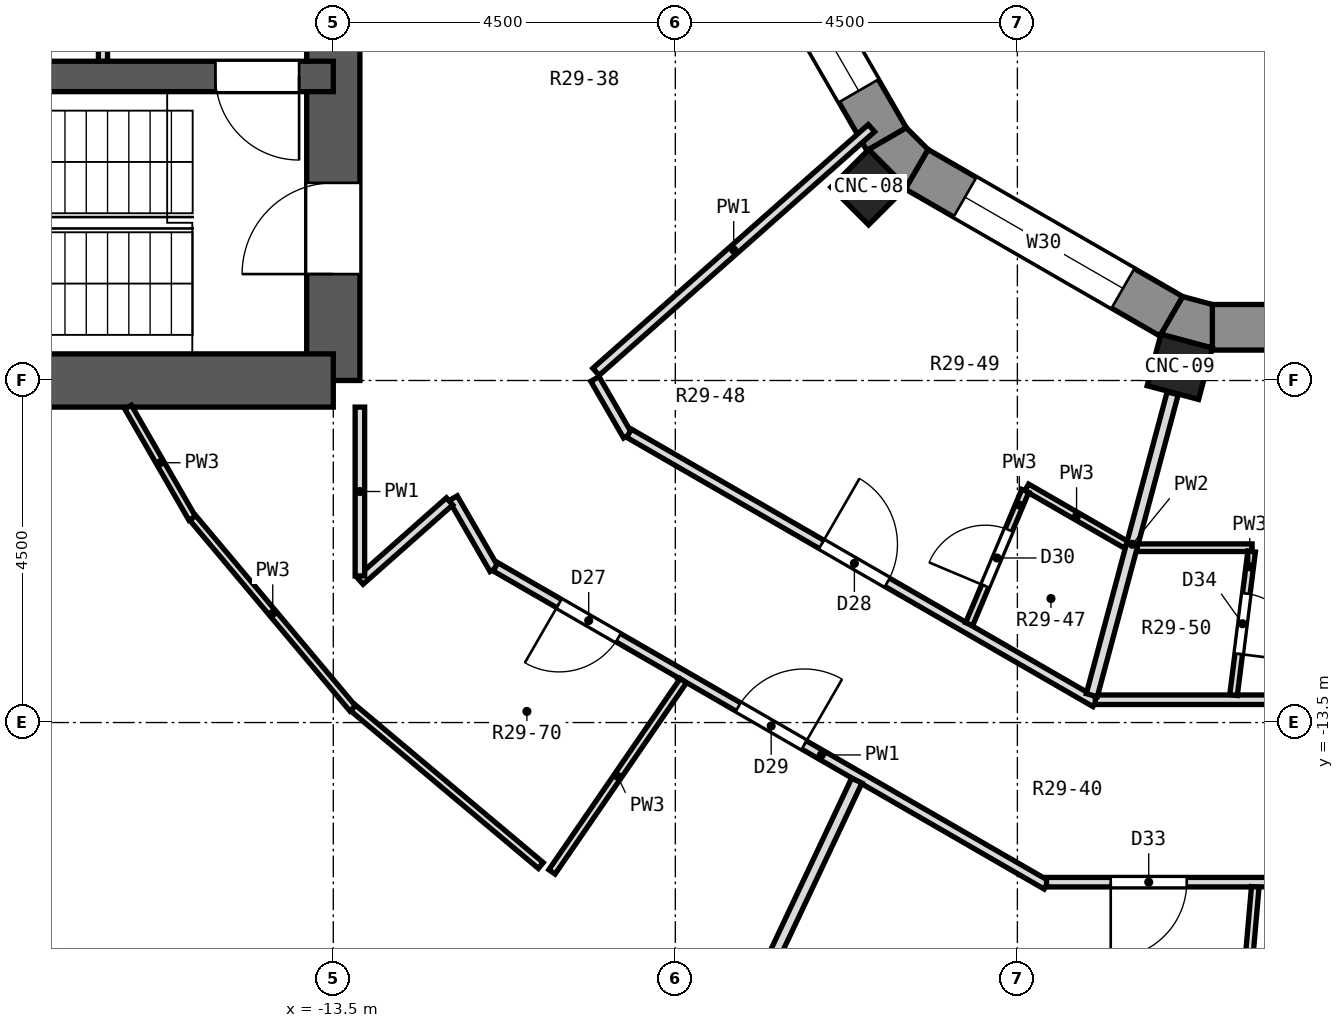
"""IFC4 building model, lengths in metres.
Left out: names, types, materials, properties, quantities, classifications, styles, units other than length and angle.
Written with IfcOpenShell. Run it as: python <this file> out.ifc"""

import sys

from ifc_helpers import new_model, si_unit, direction, frame, frame_2d, origin, origin_2d, place, context, subcontext, project, spatial, polyline, rectangle, outline, extrude, element, fill, save


model = new_model("IFC4")
c1 = context("Model", 3, precision=1e-05, world=origin(), true_north=direction((0.0, 1.0)))
c2 = subcontext(c1, "Body", "Model", "MODEL_VIEW")
j1 = project(units=[si_unit("LENGTHUNIT", "METRE"), si_unit("PLANEANGLEUNIT", "RADIAN")], contexts=[c1])
p1 = place(None, origin())
s1 = spatial("IfcSite", under=j1, at=p1, CompositionType="ELEMENT")
p2 = place(p1, origin())
s2 = spatial("IfcBuilding", under=s1, at=p2, CompositionType="ELEMENT")
p3 = place(p2, frame((0.0, 0.0, 200.4)))
s3 = spatial("IfcBuildingStorey", under=s2, at=p3, CompositionType="ELEMENT", Elevation=200.4)
for number, where, z_axis, x_axis in (
    (1, (-6.458, -6.458, 0.0), (0.0, 0.0, 1.0), (-0.707, -0.707, 0.0)),
    (2, (-2.364, -8.821, 0.0), (0.0, 0.0, 1.0), (-0.259, -0.966, 0.0)),
):
    element("IfcColumn", number, at=place(p3, frame(where, z_axis=z_axis, x_axis=x_axis)), inside=s3, PredefinedType="COLUMN", context=c2, shape_type="SweptSolid", body=[
        extrude(rectangle(XDim=0.7, YDim=0.7, at=origin_2d()), origin(), (0.0, 0.0, 1.0), 3.3),
    ])
p4 = place(p3, frame((-13.5, -9.0, 0.0), z_axis=(0.0, 0.0, 1.0), x_axis=(0.0, 1.0, 0.0)))
e3 = element("IfcWall", 3, at=p4, inside=s3, PredefinedType="SHEAR", context=c2, shape_type="SweptSolid", body=[
    extrude(rectangle(XDim=18.0, YDim=0.7, at=frame_2d((9.0, 0.0))), origin(), (0.0, 0.0, 1.0), 3.3),
])
p5 = place(p4, frame((15.4, 0.0, 0.0)))
e4 = element("IfcOpeningElement", 4, at=p5, cuts=e3, PredefinedType="OPENING", context=c2, shape_type="SweptSolid", body=[
    extrude(rectangle(XDim=1.2, YDim=2.1, at=frame_2d((0.6, 1.05))), frame((0.0, 0.362, 0.0), z_axis=(0.0, -1.0, 0.0), x_axis=(1.0, 0.0, 0.0)), (0.0, 0.0, 1.0), 0.724),
])
p6 = place(p4, frame((1.4, 0.0, 0.0)))
e5 = element("IfcOpeningElement", 5, at=p6, cuts=e3, PredefinedType="OPENING", context=c2, shape_type="SweptSolid", body=[
    extrude(rectangle(XDim=1.2, YDim=2.1, at=frame_2d((0.6, 1.05))), frame((0.0, 0.362, 0.0), z_axis=(0.0, -1.0, 0.0), x_axis=(1.0, 0.0, 0.0)), (0.0, 0.0, 1.0), 0.724),
])
p7 = place(p4, frame((7.5, 0.0, 0.0)))
e6 = element("IfcOpeningElement", 6, at=p7, cuts=e3, PredefinedType="OPENING", context=c2, shape_type="SweptSolid", body=[
    extrude(rectangle(XDim=3.0, YDim=2.4, at=frame_2d((1.5, 1.2))), frame((0.0, 0.362, 0.0), z_axis=(0.0, -1.0, 0.0), x_axis=(1.0, 0.0, 0.0)), (0.0, 0.0, 1.0), 0.724),
])
p8 = place(p3, frame((-13.5, -9.0, 0.0), z_axis=(0.0, 0.0, 1.0), x_axis=(-1.0, 0.0, 0.0)))
e7 = element("IfcWall", 7, at=p8, inside=s3, PredefinedType="SHEAR", context=c2, shape_type="SweptSolid", body=[
    extrude(rectangle(XDim=8.0, YDim=0.7, at=frame_2d((4.0, 0.0))), origin(), (0.0, 0.0, 1.0), 3.3),
])
p9 = place(p3, frame((-13.5, -5.0, 0.0), z_axis=(0.0, 0.0, 1.0), x_axis=(-1.0, 0.0, 0.0)))
e8 = element("IfcWall", 8, at=p9, inside=s3, PredefinedType="SHEAR", context=c2, shape_type="SweptSolid", body=[
    extrude(rectangle(XDim=8.0, YDim=0.4, at=frame_2d((4.0, 0.0))), origin(), (0.0, 0.0, 1.0), 3.3),
])
p10 = place(p9, frame((6.615, 0.0, 0.0)))
e9 = element("IfcOpeningElement", 9, at=p10, cuts=e8, PredefinedType="OPENING", context=c2, shape_type="SweptSolid", body=[
    extrude(rectangle(XDim=0.9, YDim=2.1, at=frame_2d((0.45, 1.05))), frame((0.0, 0.212, 0.0), z_axis=(0.0, -1.0, 0.0), x_axis=(1.0, 0.0, 0.0)), (0.0, 0.0, 1.0), 0.424),
])
p11 = place(p9, frame((0.45, 0.0, 0.0)))
e10 = element("IfcOpeningElement", 10, at=p11, cuts=e8, PredefinedType="OPENING", context=c2, shape_type="SweptSolid", body=[
    extrude(rectangle(XDim=1.1, YDim=2.1, at=frame_2d((0.55, 1.05))), frame((0.0, 0.212, 0.0), z_axis=(0.0, -1.0, 0.0), x_axis=(1.0, 0.0, 0.0)), (0.0, 0.0, 1.0), 0.424),
])
p12 = place(p3, frame((-8.156, -2.474, 0.0), z_axis=(0.0, 0.0, 1.0), x_axis=(0.500033728941, -0.866005929495, 0.0)))
e11 = element("IfcWall", 11, at=p12, inside=s3, PredefinedType="SOLIDWALL", context=c2, shape_type="SweptSolid", body=[
    extrude(rectangle(XDim=3.87, YDim=0.6, at=frame_2d((1.935, 0.0))), origin(), (0.0, 0.0, 1.0), 2.85),
])
p13 = place(p12, frame((0.735, 0.0, 0.9)))
e12 = element("IfcOpeningElement", 12, at=p13, cuts=e11, PredefinedType="OPENING", context=c2, shape_type="SweptSolid", body=[
    extrude(rectangle(XDim=2.4, YDim=1.8, at=frame_2d((1.2, 0.9))), frame((0.0, 0.312, 0.0), z_axis=(0.0, -1.0, 0.0), x_axis=(1.0, 0.0, 0.0)), (0.0, 0.0, 1.0), 0.624),
])
p14 = place(p3, frame((-5.826, -6.22, 0.0), z_axis=(0.0, 0.0, 1.0), x_axis=(0.866005929495, -0.500033728941, 0.0)))
e13 = element("IfcWall", 13, at=p14, inside=s3, PredefinedType="SOLIDWALL", context=c2, shape_type="SweptSolid", body=[
    extrude(rectangle(XDim=3.87, YDim=0.6, at=frame_2d((1.935, 0.0))), origin(), (0.0, 0.0, 1.0), 2.85),
])
p15 = place(p14, frame((0.735, 0.0, 0.9)))
e14 = element("IfcOpeningElement", 14, at=p15, cuts=e13, PredefinedType="OPENING", context=c2, shape_type="SweptSolid", body=[
    extrude(rectangle(XDim=2.4, YDim=1.8, at=frame_2d((1.2, 0.9))), frame((0.0, 0.312, 0.0), z_axis=(0.0, -1.0, 0.0), x_axis=(1.0, 0.0, 0.0)), (0.0, 0.0, 1.0), 0.624),
])
p16 = place(p3, frame((-1.935, -8.3, 0.0), z_axis=(0.0, 0.0, 1.0), x_axis=(1.0, 0.0, 0.0)))
e15 = element("IfcWall", 15, at=p16, inside=s3, PredefinedType="SOLIDWALL", context=c2, shape_type="SweptSolid", body=[
    extrude(rectangle(XDim=3.87, YDim=0.6, at=frame_2d((1.935, 0.0))), origin(), (0.0, 0.0, 1.0), 2.85),
])
p17 = place(p16, frame((0.735, 0.0, 0.9)))
e16 = element("IfcOpeningElement", 16, at=p17, cuts=e15, PredefinedType="OPENING", context=c2, shape_type="SweptSolid", body=[
    extrude(rectangle(XDim=2.4, YDim=1.8, at=frame_2d((1.2, 0.9))), frame((0.0, 0.312, 0.0), z_axis=(0.0, -1.0, 0.0), x_axis=(1.0, 0.0, 0.0)), (0.0, 0.0, 1.0), 0.624),
])
p18 = place(p3, origin())
e17 = element("IfcWall", 17, at=p18, inside=s3, PredefinedType="SOLIDWALL", context=c2, shape_type="SweptSolid", body=[
    extrude(outline(polyline([(-6.458, -5.962), (-5.962, -6.458), (-5.676, -5.961), (-5.961, -5.676), (-6.458, -5.962)])), origin(), (0.0, 0.0, 1.0), 2.85),
])
p19 = place(p3, origin())
e18 = element("IfcWall", 18, at=p19, inside=s3, PredefinedType="SOLIDWALL", context=c2, shape_type="SweptSolid", body=[
    extrude(outline(polyline([(-1.935, -8.573), (-1.935, -8.0), (-2.324, -7.896), (-2.611, -8.392), (-1.935, -8.573)])), origin(), (0.0, 0.0, 1.0), 2.85),
])
p20 = place(p3, frame((-16.2, -9.35, 0.0), z_axis=(0.0, 0.0, 1.0), x_axis=(0.499589038157, -0.866262542739, 0.0)))
e19 = element("IfcWall", 19, at=p20, inside=s3, PredefinedType="PARTITIONING", context=c2, shape_type="SweptSolid", body=[
    extrude(rectangle(XDim=1.69, YDim=0.1, at=frame_2d((0.845, 0.0))), origin(), (0.0, 0.0, 1.0), 2.85),
])
p21 = place(p3, frame((-11.923, -10.549, 0.0), z_axis=(0.0, 0.0, 1.0), x_axis=(0.500304011038, -0.865849811769, 0.0)))
e20 = element("IfcWall", 20, at=p21, inside=s3, PredefinedType="PARTITIONING", context=c2, shape_type="SweptSolid", body=[
    extrude(rectangle(XDim=1.078, YDim=0.125, at=frame_2d((0.539, 0.0))), origin(), (0.0, 0.0, 1.0), 2.85),
])
p22 = place(p3, frame((-10.058, -8.98, 0.0), z_axis=(0.0, 0.0, 1.0), x_axis=(0.500409926597, -0.865788603161, 0.0)))
e21 = element("IfcWall", 21, at=p22, inside=s3, PredefinedType="PARTITIONING", context=c2, shape_type="SweptSolid", body=[
    extrude(rectangle(XDim=0.861, YDim=0.125, at=frame_2d((0.43, 0.0))), origin(), (0.0, 0.0, 1.0), 2.85),
])
p23 = place(p3, frame((-15.349, -10.808, 0.0), z_axis=(0.0, 0.0, 1.0), x_axis=(0.642857965628, -0.765985401968, 0.0)))
e22 = element("IfcWall", 22, at=p23, inside=s3, PredefinedType="PARTITIONING", context=c2, shape_type="SweptSolid", body=[
    extrude(rectangle(XDim=3.274, YDim=0.1, at=frame_2d((1.637, 0.0))), origin(), (0.0, 0.0, 1.0), 2.85),
])
p24 = place(p3, frame((-13.239, -13.309, 0.0), z_axis=(0.0, 0.0, 1.0), x_axis=(0.76596892519, -0.642877597714, 0.0)))
e23 = element("IfcWall", 23, at=p24, inside=s3, PredefinedType="PARTITIONING", context=c2, shape_type="SweptSolid", body=[
    extrude(rectangle(XDim=3.223, YDim=0.1, at=frame_2d((1.612, 0.0))), origin(), (0.0, 0.0, 1.0), 2.85),
])
p25 = place(p3, frame((-11.366, -11.451, 0.0), z_axis=(0.0, 0.0, 1.0), x_axis=(0.866023369196, -0.500003523994, 0.0)))
e24 = element("IfcWall", 24, at=p25, inside=s3, PredefinedType="PARTITIONING", context=c2, shape_type="SweptSolid", body=[
    extrude(rectangle(XDim=8.371, YDim=0.125, at=frame_2d((4.186, 0.0))), origin(), (0.0, 0.0, 1.0), 2.85),
])
p26 = place(p25, frame((0.966, 0.0, 0.0)))
e25 = element("IfcOpeningElement", 25, at=p26, cuts=e24, PredefinedType="OPENING", context=c2, shape_type="SweptSolid", body=[
    extrude(rectangle(XDim=0.9, YDim=2.1, at=frame_2d((0.45, 1.05))), frame((0.0, 0.074, 0.0), z_axis=(0.0, -1.0, 0.0), x_axis=(1.0, 0.0, 0.0)), (0.0, 0.0, 1.0), 0.149),
])
p27 = place(p25, frame((3.688, 0.0, 0.0)))
e26 = element("IfcOpeningElement", 26, at=p27, cuts=e24, PredefinedType="OPENING", context=c2, shape_type="SweptSolid", body=[
    extrude(rectangle(XDim=1.0, YDim=2.1, at=frame_2d((0.5, 1.05))), frame((0.0, 0.074, 0.0), z_axis=(0.0, -1.0, 0.0), x_axis=(1.0, 0.0, 0.0)), (0.0, 0.0, 1.0), 0.149),
])
p28 = place(p3, frame((-9.609, -9.694, 0.0), z_axis=(0.0, 0.0, 1.0), x_axis=(0.866017984103, -0.500012851046, 0.0)))
e27 = element("IfcWall", 27, at=p28, inside=s3, PredefinedType="PARTITIONING", context=c2, shape_type="SweptSolid", body=[
    extrude(rectangle(XDim=7.083, YDim=0.125, at=frame_2d((3.542, 0.0))), origin(), (0.0, 0.0, 1.0), 2.85),
])
p29 = place(p28, frame((2.923, 0.0, 0.0)))
e28 = element("IfcOpeningElement", 28, at=p29, cuts=e27, PredefinedType="OPENING", context=c2, shape_type="SweptSolid", body=[
    extrude(rectangle(XDim=1.0, YDim=2.1, at=frame_2d((0.5, 1.05))), frame((0.0, 0.074, 0.0), z_axis=(0.0, -1.0, 0.0), x_axis=(1.0, 0.0, 0.0)), (0.0, 0.0, 1.0), 0.149),
])
p30 = place(p3, frame((-4.377, -10.406, 0.0), z_axis=(0.0, 0.0, 1.0), x_axis=(0.86612113491, -0.499834152157, 0.0)))
e29 = element("IfcWall", 29, at=p30, inside=s3, PredefinedType="PARTITIONING", context=c2, shape_type="SweptSolid", body=[
    extrude(rectangle(XDim=1.514, YDim=0.1, at=frame_2d((0.757, 0.0))), origin(), (0.0, 0.0, 1.0), 2.85),
])
p31 = place(p3, frame((-4.116, -15.6, 0.0), z_axis=(0.0, 0.0, 1.0), x_axis=(1.0, 0.0, 0.0)))
e30 = element("IfcWall", 30, at=p31, inside=s3, PredefinedType="PARTITIONING", context=c2, shape_type="SweptSolid", body=[
    extrude(rectangle(XDim=8.369, YDim=0.125, at=frame_2d((4.184, 0.0))), origin(), (0.0, 0.0, 1.0), 2.85),
])
p32 = place(p31, frame((0.844, 0.0, 0.0)))
e31 = element("IfcOpeningElement", 31, at=p32, cuts=e30, PredefinedType="OPENING", context=c2, shape_type="SweptSolid", body=[
    extrude(rectangle(XDim=1.0, YDim=2.1, at=frame_2d((0.5, 1.05))), frame((0.0, 0.074, 0.0), z_axis=(0.0, -1.0, 0.0), x_axis=(1.0, 0.0, 0.0)), (0.0, 0.0, 1.0), 0.149),
])
p33 = place(p3, frame((-3.475, -13.2, 0.0), z_axis=(0.0, 0.0, 1.0), x_axis=(1.0, 0.0, 0.0)))
e32 = element("IfcWall", 32, at=p33, inside=s3, PredefinedType="PARTITIONING", context=c2, shape_type="SweptSolid", body=[
    extrude(rectangle(XDim=7.084, YDim=0.125, at=frame_2d((3.542, 0.0))), origin(), (0.0, 0.0, 1.0), 2.85),
])
p34 = place(p33, frame((3.025, 0.0, 0.0)))
e33 = element("IfcOpeningElement", 33, at=p34, cuts=e32, PredefinedType="OPENING", context=c2, shape_type="SweptSolid", body=[
    extrude(rectangle(XDim=1.0, YDim=2.1, at=frame_2d((0.5, 1.05))), frame((0.0, 0.074, 0.0), z_axis=(0.0, -1.0, 0.0), x_axis=(1.0, 0.0, 0.0)), (0.0, 0.0, 1.0), 0.149),
])
p35 = place(p33, frame((5.626, 0.0, 0.0)))
e34 = element("IfcOpeningElement", 34, at=p35, cuts=e32, PredefinedType="OPENING", context=c2, shape_type="SweptSolid", body=[
    extrude(rectangle(XDim=1.0, YDim=2.1, at=frame_2d((0.5, 1.05))), frame((0.0, 0.074, 0.0), z_axis=(0.0, -1.0, 0.0), x_axis=(1.0, 0.0, 0.0)), (0.0, 0.0, 1.0), 0.149),
])
p36 = place(p3, frame((-2.926, -11.2, 0.0), z_axis=(0.0, 0.0, 1.0), x_axis=(1.0, 0.0, 0.0)))
e35 = element("IfcWall", 35, at=p36, inside=s3, PredefinedType="PARTITIONING", context=c2, shape_type="SweptSolid", body=[
    extrude(rectangle(XDim=1.514, YDim=0.1, at=frame_2d((0.757, 0.0))), origin(), (0.0, 0.0, 1.0), 2.85),
])
p37 = place(p3, frame((-13.15, -11.634, 0.0), z_axis=(0.0, 0.0, 1.0), x_axis=(0.748946277056, 0.662630722261, 0.0)))
e36 = element("IfcWall", 36, at=p37, inside=s3, PredefinedType="PARTITIONING", context=c2, shape_type="SweptSolid", body=[
    extrude(rectangle(XDim=1.575, YDim=0.125, at=frame_2d((0.788, 0.0))), origin(), (0.0, 0.0, 1.0), 2.85),
])
p38 = place(p3, frame((-10.044, -8.886, 0.0), z_axis=(0.0, 0.0, 1.0), x_axis=(0.748977300745, 0.662595655712, 0.0)))
e37 = element("IfcWall", 37, at=p38, inside=s3, PredefinedType="PARTITIONING", context=c2, shape_type="SweptSolid", body=[
    extrude(rectangle(XDim=4.839, YDim=0.125, at=frame_2d((2.419, 0.0))), origin(), (0.0, 0.0, 1.0), 2.85),
])
p39 = place(p3, frame((-10.623, -15.465, 0.0), z_axis=(0.0, 0.0, 1.0), x_axis=(0.566094144379, 0.824340596902, 0.0)))
e38 = element("IfcWall", 38, at=p39, inside=s3, PredefinedType="PARTITIONING", context=c2, shape_type="SweptSolid", body=[
    extrude(rectangle(XDim=3.052, YDim=0.1, at=frame_2d((1.526, 0.0))), origin(), (0.0, 0.0, 1.0), 2.85),
])
p40 = place(p3, frame((-10.031, -21.517, 0.0), z_axis=(0.0, 0.0, 1.0), x_axis=(0.426351254657, 0.904557686194, 0.0)))
e39 = element("IfcWall", 39, at=p40, inside=s3, PredefinedType="PARTITIONING", context=c2, shape_type="SweptSolid", body=[
    extrude(rectangle(XDim=8.018, YDim=0.15, at=frame_2d((4.009, 0.0))), origin(), (0.0, 0.0, 1.0), 2.85),
])
p41 = place(p3, frame((-5.135, -12.206, 0.0), z_axis=(0.0, 0.0, 1.0), x_axis=(0.387856236325, 0.921719881495, 0.0)))
e40 = element("IfcWall", 40, at=p41, inside=s3, PredefinedType="PARTITIONING", context=c2, shape_type="SweptSolid", body=[
    extrude(rectangle(XDim=1.903, YDim=0.1, at=frame_2d((0.951, 0.0))), origin(), (0.0, 0.0, 1.0), 2.85),
])
p42 = place(p41, frame((0.545, 0.0, 0.0)))
e41 = element("IfcOpeningElement", 41, at=p42, cuts=e40, PredefinedType="OPENING", context=c2, shape_type="SweptSolid", body=[
    extrude(rectangle(XDim=0.8, YDim=2.1, at=frame_2d((0.4, 1.05))), frame((0.0, 0.062, 0.0), z_axis=(0.0, -1.0, 0.0), x_axis=(1.0, 0.0, 0.0)), (0.0, 0.0, 1.0), 0.124),
])
p43 = place(p3, frame((-3.521, -13.14, 0.0), z_axis=(0.0, 0.0, 1.0), x_axis=(0.258863724951, 0.965913853252, 0.0)))
e42 = element("IfcWall", 42, at=p43, inside=s3, PredefinedType="PARTITIONING", context=c2, shape_type="SweptSolid", body=[
    extrude(rectangle(XDim=4.111, YDim=0.15, at=frame_2d((2.056, 0.0))), origin(), (0.0, 0.0, 1.0), 2.85),
])
p44 = place(p3, frame((-1.656, -13.138, 0.0), z_axis=(0.0, 0.0, 1.0), x_axis=(0.125060808232, 0.992149078639, 0.0)))
e43 = element("IfcWall", 43, at=p44, inside=s3, PredefinedType="PARTITIONING", context=c2, shape_type="SweptSolid", body=[
    extrude(rectangle(XDim=1.903, YDim=0.1, at=frame_2d((0.952, 0.0))), origin(), (0.0, 0.0, 1.0), 2.85),
])
p45 = place(p44, frame((0.545, 0.0, 0.0)))
e44 = element("IfcOpeningElement", 44, at=p45, cuts=e43, PredefinedType="OPENING", context=c2, shape_type="SweptSolid", body=[
    extrude(rectangle(XDim=0.8, YDim=2.1, at=frame_2d((0.4, 1.05))), frame((0.0, 0.062, 0.0), z_axis=(0.0, -1.0, 0.0), x_axis=(1.0, 0.0, 0.0)), (0.0, 0.0, 1.0), 0.124),
])
p46 = place(p3, frame((-1.666, -19.043, 0.0), z_axis=(0.0, 0.0, 1.0), x_axis=(0.086986657325, 0.99620947669, 0.0)))
e45 = element("IfcWall", 45, at=p46, inside=s3, PredefinedType="PARTITIONING", context=c2, shape_type="SweptSolid", body=[
    extrude(rectangle(XDim=3.393, YDim=0.1, at=frame_2d((1.697, 0.0))), origin(), (0.0, 0.0, 1.0), 2.85),
])
p47 = place(p46, frame((1.247, 0.0, 0.0)))
e46 = element("IfcOpeningElement", 46, at=p47, cuts=e45, PredefinedType="OPENING", context=c2, shape_type="SweptSolid", body=[
    extrude(rectangle(XDim=0.9, YDim=2.1, at=frame_2d((0.45, 1.05))), frame((0.0, 0.062, 0.0), z_axis=(0.0, -1.0, 0.0), x_axis=(1.0, 0.0, 0.0)), (0.0, 0.0, 1.0), 0.124),
])
p48 = place(p46, frame((0.147, 0.0, 0.0)))
e47 = element("IfcOpeningElement", 47, at=p48, cuts=e45, PredefinedType="OPENING", context=c2, shape_type="SweptSolid", body=[
    extrude(rectangle(XDim=0.9, YDim=2.1, at=frame_2d((0.45, 1.05))), frame((0.0, 0.062, 0.0), z_axis=(0.0, -1.0, 0.0), x_axis=(1.0, 0.0, 0.0)), (0.0, 0.0, 1.0), 0.124),
])
p49 = place(p3, frame((-13.15, -11.572, 0.0), z_axis=(0.0, 0.0, 1.0), x_axis=(0.0, 1.0, 0.0)))
e48 = element("IfcWall", 48, at=p49, inside=s3, PredefinedType="PARTITIONING", context=c2, shape_type="SweptSolid", body=[
    extrude(rectangle(XDim=2.221, YDim=0.125, at=frame_2d((1.111, 0.0))), origin(), (0.0, 0.0, 1.0), 2.85),
])
p50 = place(p3, frame((-16.53, -4.8, 0.0), z_axis=(0.0, 0.0, 1.0), x_axis=(0.0, 1.0, 0.0)))
e49 = element("IfcWall", 49, at=p50, inside=s3, PredefinedType="PARTITIONING", context=c2, shape_type="SweptSolid", body=[
    extrude(rectangle(XDim=2.6, YDim=0.12, at=frame_2d((1.3, 0.0))), origin(), (0.0, 0.0, 1.0), 2.85),
])
p51 = place(p50, frame((0.75, 0.0, 0.0)))
e50 = element("IfcOpeningElement", 50, at=p51, cuts=e49, PredefinedType="OPENING", context=c2, shape_type="SweptSolid", body=[
    extrude(rectangle(XDim=1.1, YDim=2.1, at=frame_2d((0.55, 1.05))), frame((0.0, 0.072, 0.0), z_axis=(0.0, -1.0, 0.0), x_axis=(1.0, 0.0, 0.0)), (0.0, 0.0, 1.0), 0.144),
])
p52 = place(p13, origin())
e51 = element("IfcWindow", 51, at=p52, inside=s3, PartitioningType="SINGLE_PANEL", PredefinedType="WINDOW", context=c2, shape_type="SweptSolid", body=[
    extrude(rectangle(XDim=2.4, YDim=1.8, at=frame_2d((1.2, 0.9))), frame((0.0, -0.12, 0.0), z_axis=(0.0, -1.0, 0.0), x_axis=(1.0, 0.0, 0.0)), (0.0, 0.0, 1.0), 0.06),
])
fill(e12, e51)
p53 = place(p15, origin())
e52 = element("IfcWindow", 52, at=p53, inside=s3, PartitioningType="SINGLE_PANEL", PredefinedType="WINDOW", context=c2, shape_type="SweptSolid", body=[
    extrude(rectangle(XDim=2.4, YDim=1.8, at=frame_2d((1.2, 0.9))), frame((0.0, -0.12, 0.0), z_axis=(0.0, -1.0, 0.0), x_axis=(1.0, 0.0, 0.0)), (0.0, 0.0, 1.0), 0.06),
])
fill(e14, e52)
p54 = place(p26, frame((0.9, 0.0, 0.0), z_axis=(0.0, 0.0, 1.0), x_axis=(-1.0, 0.0, 0.0)))
e53 = element("IfcDoor", 53, at=p54, inside=s3, OperationType="SINGLE_SWING_RIGHT", PredefinedType="DOOR", context=c2, shape_type="SweptSolid", body=[
    extrude(rectangle(XDim=0.9, YDim=2.1, at=frame_2d((0.45, 1.05))), frame((0.0, 0.025, 0.0), z_axis=(0.0, -1.0, 0.0), x_axis=(1.0, 0.0, 0.0)), (0.0, 0.0, 1.0), 0.05),
])
fill(e25, e53)
p55 = place(p29, origin())
e54 = element("IfcDoor", 54, at=p55, inside=s3, OperationType="SINGLE_SWING_LEFT", PredefinedType="DOOR", context=c2, shape_type="SweptSolid", body=[
    extrude(rectangle(XDim=1.0, YDim=2.1, at=frame_2d((0.5, 1.05))), frame((0.0, 0.025, 0.0), z_axis=(0.0, -1.0, 0.0), x_axis=(1.0, 0.0, 0.0)), (0.0, 0.0, 1.0), 0.05),
])
fill(e28, e54)
p56 = place(p27, origin())
e55 = element("IfcDoor", 55, at=p56, inside=s3, OperationType="SINGLE_SWING_RIGHT", PredefinedType="DOOR", context=c2, shape_type="SweptSolid", body=[
    extrude(rectangle(XDim=1.0, YDim=2.1, at=frame_2d((0.5, 1.05))), frame((0.0, 0.025, 0.0), z_axis=(0.0, -1.0, 0.0), x_axis=(1.0, 0.0, 0.0)), (0.0, 0.0, 1.0), 0.05),
])
fill(e26, e55)
p57 = place(p42, origin())
e56 = element("IfcDoor", 56, at=p57, inside=s3, OperationType="SINGLE_SWING_LEFT", PredefinedType="DOOR", context=c2, shape_type="SweptSolid", body=[
    extrude(rectangle(XDim=0.8, YDim=2.1, at=frame_2d((0.4, 1.05))), frame((0.0, 0.025, 0.0), z_axis=(0.0, -1.0, 0.0), x_axis=(1.0, 0.0, 0.0)), (0.0, 0.0, 1.0), 0.05),
])
fill(e41, e56)
p58 = place(p32, frame((1.0, 0.0, 0.0), z_axis=(0.0, 0.0, 1.0), x_axis=(-1.0, 0.0, 0.0)))
e57 = element("IfcDoor", 57, at=p58, inside=s3, OperationType="SINGLE_SWING_RIGHT", PredefinedType="DOOR", context=c2, shape_type="SweptSolid", body=[
    extrude(rectangle(XDim=1.0, YDim=2.1, at=frame_2d((0.5, 1.05))), frame((0.0, 0.025, 0.0), z_axis=(0.0, -1.0, 0.0), x_axis=(1.0, 0.0, 0.0)), (0.0, 0.0, 1.0), 0.05),
])
fill(e31, e57)
p59 = place(p45, frame((0.8, 0.0, 0.0), z_axis=(0.0, 0.0, 1.0), x_axis=(-1.0, 0.0, 0.0)))
e58 = element("IfcDoor", 58, at=p59, inside=s3, OperationType="SINGLE_SWING_RIGHT", PredefinedType="DOOR", context=c2, shape_type="SweptSolid", body=[
    extrude(rectangle(XDim=0.8, YDim=2.1, at=frame_2d((0.4, 1.05))), frame((0.0, 0.025, 0.0), z_axis=(0.0, -1.0, 0.0), x_axis=(1.0, 0.0, 0.0)), (0.0, 0.0, 1.0), 0.05),
])
fill(e44, e58)
p60 = place(p11, origin())
e59 = element("IfcDoor", 59, at=p60, inside=s3, OperationType="SINGLE_SWING_LEFT", PredefinedType="DOOR", context=c2, shape_type="SweptSolid", body=[
    extrude(rectangle(XDim=1.1, YDim=2.1, at=frame_2d((0.55, 1.05))), frame((0.0, 0.025, 0.0), z_axis=(0.0, -1.0, 0.0), x_axis=(1.0, 0.0, 0.0)), (0.0, 0.0, 1.0), 0.05),
])
fill(e10, e59)
p61 = place(p6, origin())
e60 = element("IfcDoor", 60, at=p61, inside=s3, OperationType="SINGLE_SWING_LEFT", PredefinedType="DOOR", context=c2, shape_type="SweptSolid", body=[
    extrude(rectangle(XDim=1.2, YDim=2.1, at=frame_2d((0.6, 1.05))), frame((0.0, 0.025, 0.0), z_axis=(0.0, -1.0, 0.0), x_axis=(1.0, 0.0, 0.0)), (0.0, 0.0, 1.0), 0.05),
])
fill(e5, e60)
save(model, sys.argv[1])
